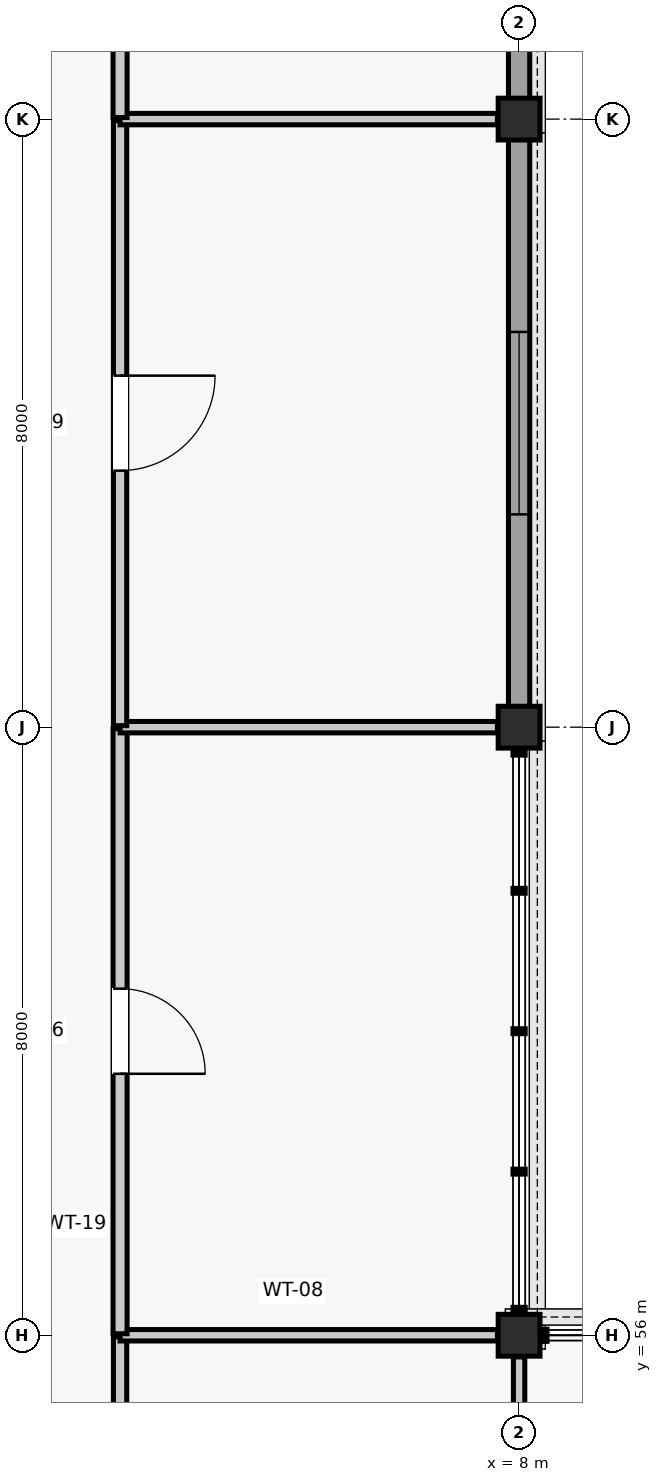
"""IFC4 building model, lengths in metres.
Left out: names, types, materials, properties, quantities, classifications, styles, units other than length and angle.
Written with IfcOpenShell. Run it as: python <this file> out.ifc"""

import sys

from ifc_helpers import new_model, si_unit, direction, frame, frame_2d, origin, origin_2d, place, context, subcontext, project, spatial, rectangle, extrude, element, fill, save


model = new_model("IFC4")
c1 = context("Model", 3, precision=1e-05, world=origin(), true_north=direction((0.0, 1.0)))
c2 = subcontext(c1, "Body", "Model", "MODEL_VIEW")
j1 = project(units=[si_unit("LENGTHUNIT", "METRE"), si_unit("PLANEANGLEUNIT", "RADIAN")], contexts=[c1])
p1 = place(None, origin())
s1 = spatial("IfcSite", under=j1, at=p1, CompositionType="ELEMENT")
p2 = place(p1, origin())
s2 = spatial("IfcBuilding", under=s1, at=p2, CompositionType="ELEMENT")
p3 = place(p2, frame((0.0, 0.0, 17.82)))
s3 = spatial("IfcBuildingStorey", under=s2, at=p3, CompositionType="ELEMENT", Elevation=17.82)
for number, where, z_axis, x_axis in (
    (1, (8.0, 56.0, 0.0), (0.0, 0.0, 1.0), (1.0, 0.0, 0.0)),
    (2, (8.0, 64.0, 0.0), (0.0, 0.0, 1.0), (1.0, 0.0, 0.0)),
    (3, (8.0, 72.0, 0.0), (0.0, 0.0, 1.0), (1.0, 0.0, 0.0)),
):
    element("IfcColumn", number, at=place(p3, frame(where, z_axis=z_axis, x_axis=x_axis)), inside=s3, PredefinedType="COLUMN", context=c2, shape_type="SweptSolid", body=[
        extrude(rectangle(XDim=0.55, YDim=0.55, at=origin_2d()), origin(), (0.0, 0.0, 1.0), 3.96),
    ])
p4 = place(p3, frame((8.0, 64.26, 0.0), z_axis=(0.0, 0.0, 1.0), x_axis=(0.0, 1.0, 0.0)))
e4 = element("IfcWall", 4, at=p4, inside=s3, PredefinedType="SOLIDWALL", context=c2, shape_type="SweptSolid", body=[
    extrude(rectangle(XDim=7.48, YDim=0.28, at=frame_2d((3.74, 0.0))), origin(), (0.0, 0.0, 1.0), 3.349),
])
p5 = place(p4, frame((2.54, 0.0, 0.9)))
e5 = element("IfcOpeningElement", 5, at=p5, cuts=e4, PredefinedType="OPENING", context=c2, shape_type="SweptSolid", body=[
    extrude(rectangle(XDim=2.4, YDim=2.0, at=frame_2d((1.2, 1.0))), frame((0.0, 0.15, 0.0), z_axis=(0.0, -1.0, 0.0), x_axis=(1.0, 0.0, 0.0)), (0.0, 0.0, 1.0), 0.3),
])
p6 = place(p3, frame((8.0, 72.26, 0.0), z_axis=(0.0, 0.0, 1.0), x_axis=(0.0, 1.0, 0.0)))
e6 = element("IfcWall", 6, at=p6, inside=s3, PredefinedType="SOLIDWALL", context=c2, shape_type="SweptSolid", body=[
    extrude(rectangle(XDim=7.43, YDim=0.28, at=frame_2d((3.715, 0.0))), origin(), (0.0, 0.0, 1.0), 3.309),
])
p7 = place(p6, frame((2.615, 0.0, 0.9)))
e7 = element("IfcOpeningElement", 7, at=p7, cuts=e6, PredefinedType="OPENING", context=c2, shape_type="SweptSolid", body=[
    extrude(rectangle(XDim=2.2, YDim=2.0, at=frame_2d((1.1, 1.0))), frame((0.0, 0.15, 0.0), z_axis=(0.0, -1.0, 0.0), x_axis=(1.0, 0.0, 0.0)), (0.0, 0.0, 1.0), 0.3),
])
p8 = place(p3, frame((2.75, 50.7, 0.0), z_axis=(0.0, 0.0, 1.0), x_axis=(0.0, 1.0, 0.0)))
e8 = element("IfcWall", 8, at=p8, inside=s3, PredefinedType="PARTITIONING", context=c2, shape_type="SweptSolid", body=[
    extrude(rectangle(XDim=5.28, YDim=0.175, at=frame_2d((2.64, 0.0))), origin(), (0.0, 0.0, 1.0), 3.385),
])
p9 = place(p3, frame((2.75, 56.0, 0.0), z_axis=(0.0, 0.0, 1.0), x_axis=(1.0, 0.0, 0.0)))
e9 = element("IfcWall", 9, at=p9, inside=s3, PredefinedType="PARTITIONING", context=c2, shape_type="SweptSolid", body=[
    extrude(rectangle(XDim=4.965, YDim=0.15, at=frame_2d((2.482, 0.0))), origin(), (0.0, 0.0, 1.0), 3.437),
])
p10 = place(p3, frame((8.0, 50.75, 0.0), z_axis=(0.0, 0.0, 1.0), x_axis=(0.0, 1.0, 0.0)))
e10 = element("IfcWall", 10, at=p10, inside=s3, PredefinedType="PARTITIONING", context=c2, shape_type="SweptSolid", body=[
    extrude(rectangle(XDim=4.965, YDim=0.15, at=frame_2d((2.482, 0.0))), origin(), (0.0, 0.0, 1.0), 3.238),
])
p11 = place(p3, frame((2.75, 56.02, 0.0), z_axis=(0.0, 0.0, 1.0), x_axis=(0.0, 1.0, 0.0)))
e11 = element("IfcWall", 11, at=p11, inside=s3, PredefinedType="PARTITIONING", context=c2, shape_type="SweptSolid", body=[
    extrude(rectangle(XDim=7.96, YDim=0.185, at=frame_2d((3.98, 0.0))), origin(), (0.0, 0.0, 1.0), 3.232),
])
p12 = place(p11, frame((3.42, 0.0, 0.0)))
e12 = element("IfcOpeningElement", 12, at=p12, cuts=e11, PredefinedType="OPENING", context=c2, shape_type="SweptSolid", body=[
    extrude(rectangle(XDim=1.12, YDim=2.22, at=frame_2d((0.56, 1.11))), frame((0.0, 0.103, 0.0), z_axis=(0.0, -1.0, 0.0), x_axis=(1.0, 0.0, 0.0)), (0.0, 0.0, 1.0), 0.205),
])
p13 = place(p3, frame((2.75, 64.0, 0.0), z_axis=(0.0, 0.0, 1.0), x_axis=(1.0, 0.0, 0.0)))
e13 = element("IfcWall", 13, at=p13, inside=s3, PredefinedType="PARTITIONING", context=c2, shape_type="SweptSolid", body=[
    extrude(rectangle(XDim=4.965, YDim=0.15, at=frame_2d((2.482, 0.0))), origin(), (0.0, 0.0, 1.0), 3.232),
])
p14 = place(p3, frame((2.75, 64.02, 0.0), z_axis=(0.0, 0.0, 1.0), x_axis=(0.0, 1.0, 0.0)))
e14 = element("IfcWall", 14, at=p14, inside=s3, PredefinedType="PARTITIONING", context=c2, shape_type="SweptSolid", body=[
    extrude(rectangle(XDim=7.96, YDim=0.175, at=frame_2d((3.98, 0.0))), origin(), (0.0, 0.0, 1.0), 3.232),
])
p15 = place(p14, frame((3.355, 0.0, 0.0)))
e15 = element("IfcOpeningElement", 15, at=p15, cuts=e14, PredefinedType="OPENING", context=c2, shape_type="SweptSolid", body=[
    extrude(rectangle(XDim=1.25, YDim=2.18, at=frame_2d((0.625, 1.09))), frame((0.0, 0.097, 0.0), z_axis=(0.0, -1.0, 0.0), x_axis=(1.0, 0.0, 0.0)), (0.0, 0.0, 1.0), 0.195),
])
p16 = place(p3, frame((2.75, 72.0, 0.0), z_axis=(0.0, 0.0, 1.0), x_axis=(1.0, 0.0, 0.0)))
e16 = element("IfcWall", 16, at=p16, inside=s3, PredefinedType="PARTITIONING", context=c2, shape_type="SweptSolid", body=[
    extrude(rectangle(XDim=4.965, YDim=0.15, at=frame_2d((2.482, 0.0))), origin(), (0.0, 0.0, 1.0), 3.238),
])
p17 = place(p3, frame((2.75, 72.02, 0.0), z_axis=(0.0, 0.0, 1.0), x_axis=(0.0, 1.0, 0.0)))
e17 = element("IfcWall", 17, at=p17, inside=s3, PredefinedType="PARTITIONING", context=c2, shape_type="SweptSolid", body=[
    extrude(rectangle(XDim=7.96, YDim=0.185, at=frame_2d((3.98, 0.0))), origin(), (0.0, 0.0, 1.0), 3.238),
])
p18 = place(p17, frame((3.51, 0.0, 0.0)))
e18 = element("IfcOpeningElement", 18, at=p18, cuts=e17, PredefinedType="OPENING", context=c2, shape_type="SweptSolid", body=[
    extrude(rectangle(XDim=0.94, YDim=2.12, at=frame_2d((0.47, 1.06))), frame((0.0, 0.103, 0.0), z_axis=(0.0, -1.0, 0.0), x_axis=(1.0, 0.0, 0.0)), (0.0, 0.0, 1.0), 0.205),
])
p19 = place(p5, origin())
e19 = element("IfcWindow", 19, at=p19, inside=s3, PartitioningType="SINGLE_PANEL", PredefinedType="WINDOW", context=c2, shape_type="SweptSolid", body=[
    extrude(rectangle(XDim=2.4, YDim=2.0, at=frame_2d((1.2, 1.0))), frame((0.0, 0.03, 0.0), z_axis=(0.0, -1.0, 0.0), x_axis=(1.0, 0.0, 0.0)), (0.0, 0.0, 1.0), 0.06),
])
fill(e5, e19)
p20 = place(p12, frame((1.12, 0.0, 0.0), z_axis=(0.0, 0.0, 1.0), x_axis=(-1.0, 0.0, 0.0)))
e20 = element("IfcDoor", 20, at=p20, inside=s3, OperationType="SINGLE_SWING_LEFT", PredefinedType="DOOR", context=c2, shape_type="SweptSolid", body=[
    extrude(rectangle(XDim=1.12, YDim=2.22, at=frame_2d((0.56, 1.11))), frame((0.0, 0.025, 0.0), z_axis=(0.0, -1.0, 0.0), x_axis=(1.0, 0.0, 0.0)), (0.0, 0.0, 1.0), 0.05),
])
fill(e12, e20)
p21 = place(p15, frame((1.25, 0.0, 0.0), z_axis=(0.0, 0.0, 1.0), x_axis=(-1.0, 0.0, 0.0)))
e21 = element("IfcDoor", 21, at=p21, inside=s3, OperationType="SINGLE_SWING_RIGHT", PredefinedType="DOOR", context=c2, shape_type="SweptSolid", body=[
    extrude(rectangle(XDim=1.25, YDim=2.18, at=frame_2d((0.625, 1.09))), frame((0.0, 0.025, 0.0), z_axis=(0.0, -1.0, 0.0), x_axis=(1.0, 0.0, 0.0)), (0.0, 0.0, 1.0), 0.05),
])
fill(e15, e21)
save(model, sys.argv[1])
